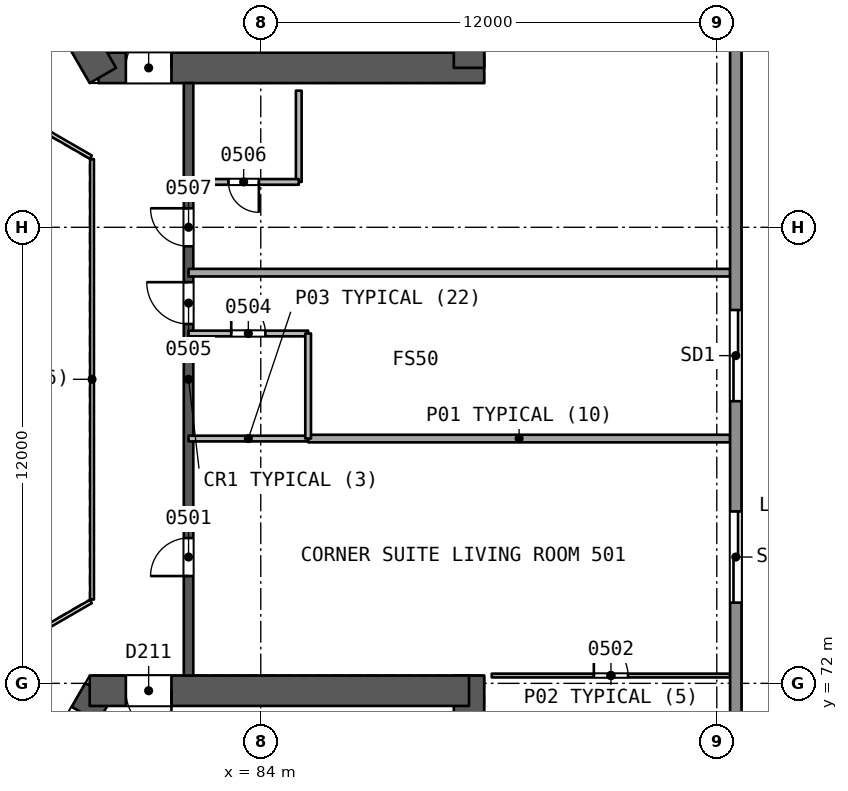
"""IFC4 building model, lengths in metres.
Left out: names, types, materials, properties, quantities, classifications, styles, units other than length and angle.
Written with IfcOpenShell. Run it as: python <this file> out.ifc"""

import sys

from ifc_helpers import new_model, si_unit, direction, frame, frame_2d, origin, place, context, subcontext, project, spatial, rectangle, extrude, element, fill, save


model = new_model("IFC4")
c1 = context("Model", 3, precision=1e-05, world=origin(), true_north=direction((0.0, 1.0)))
c2 = subcontext(c1, "Body", "Model", "MODEL_VIEW")
j1 = project(units=[si_unit("LENGTHUNIT", "METRE"), si_unit("PLANEANGLEUNIT", "RADIAN")], contexts=[c1])
p1 = place(None, origin())
s1 = spatial("IfcSite", under=j1, at=p1, CompositionType="ELEMENT")
p2 = place(p1, origin())
s2 = spatial("IfcBuilding", under=s1, at=p2, CompositionType="ELEMENT")
p3 = place(p2, frame((0.0, 0.0, 30.0)))
s3 = spatial("IfcBuildingStorey", under=s2, at=p3, CompositionType="ELEMENT", Elevation=30.0)
p4 = place(p3, frame((79.731, 88.194, 0.0), z_axis=(0.0, 0.0, 1.0), x_axis=(1.0, 0.0, 0.0)))
e1 = element("IfcWall", 1, at=p4, inside=s3, PredefinedType="SHEAR", context=c2, shape_type="SweptSolid", body=[
    extrude(rectangle(XDim=10.149, YDim=0.8, at=frame_2d((5.074, 0.0))), origin(), (0.0, 0.0, 1.0), 3.7),
])
p5 = place(p4, frame((0.719, 0.0, 0.0)))
e2 = element("IfcOpeningElement", 2, at=p5, cuts=e1, PredefinedType="OPENING", context=c2, shape_type="SweptSolid", body=[
    extrude(rectangle(XDim=1.2, YDim=2.1, at=frame_2d((0.6, 1.05))), frame((0.0, 0.411, 0.0), z_axis=(0.0, -1.0, 0.0), x_axis=(1.0, 0.0, 0.0)), (0.0, 0.0, 1.0), 0.821),
])
p6 = place(p3, frame((89.48, 88.194, 0.0), z_axis=(0.0, 0.0, 1.0), x_axis=(0.0, 1.0, 0.0)))
e3 = element("IfcWall", 3, at=p6, inside=s3, PredefinedType="SHEAR", context=c2, shape_type="SweptSolid", body=[
    extrude(rectangle(XDim=13.933, YDim=0.8, at=frame_2d((6.967, 0.0))), origin(), (0.0, 0.0, 1.0), 3.7),
])
p7 = place(p3, frame((74.856, 96.637, 0.0), z_axis=(0.0, 0.0, 1.0), x_axis=(0.499993500917, -0.866029155999, 0.0)))
e4 = element("IfcWall", 4, at=p7, inside=s3, PredefinedType="SHEAR", context=c2, shape_type="SweptSolid", body=[
    extrude(rectangle(XDim=9.98, YDim=0.8, at=frame_2d((4.99, 0.0))), origin(), (0.0, 0.0, 1.0), 3.7),
])
p8 = place(p7, frame((7.83, 0.0, 0.0)))
e5 = element("IfcOpeningElement", 5, at=p8, cuts=e4, PredefinedType="OPENING", context=c2, shape_type="SweptSolid", body=[
    extrude(rectangle(XDim=1.2, YDim=2.1, at=frame_2d((0.6, 1.05))), frame((0.0, 0.411, 0.0), z_axis=(0.0, -1.0, 0.0), x_axis=(1.0, 0.0, 0.0)), (0.0, 0.0, 1.0), 0.821),
])
p9 = place(p3, frame((79.731, 71.806, 0.0), z_axis=(0.0, 0.0, 1.0), x_axis=(-0.49999662545, -0.866027352073, 0.0)))
e6 = element("IfcWall", 6, at=p9, inside=s3, PredefinedType="SHEAR", context=c2, shape_type="SweptSolid", body=[
    extrude(rectangle(XDim=10.149, YDim=0.8, at=frame_2d((5.074, 0.0))), origin(), (0.0, 0.0, 1.0), 3.7),
])
p10 = place(p9, frame((0.719, 0.0, 0.0)))
e7 = element("IfcOpeningElement", 7, at=p10, cuts=e6, PredefinedType="OPENING", context=c2, shape_type="SweptSolid", body=[
    extrude(rectangle(XDim=1.2, YDim=2.1, at=frame_2d((0.6, 1.05))), frame((0.0, 0.411, 0.0), z_axis=(0.0, -1.0, 0.0), x_axis=(1.0, 0.0, 0.0)), (0.0, 0.0, 1.0), 0.821),
])
p11 = place(p3, frame((89.48, 58.103, 0.0), z_axis=(0.0, 0.0, 1.0), x_axis=(0.0, 1.0, 0.0)))
e8 = element("IfcWall", 8, at=p11, inside=s3, PredefinedType="SHEAR", context=c2, shape_type="SweptSolid", body=[
    extrude(rectangle(XDim=14.103, YDim=0.8, at=frame_2d((7.051, 0.0))), origin(), (0.0, 0.0, 1.0), 3.7),
])
p12 = place(p3, frame((89.48, 71.806, 0.0), z_axis=(0.0, 0.0, 1.0), x_axis=(-1.0, 0.0, 0.0)))
e9 = element("IfcWall", 9, at=p12, inside=s3, PredefinedType="SHEAR", context=c2, shape_type="SweptSolid", body=[
    extrude(rectangle(XDim=9.98, YDim=0.8, at=frame_2d((4.99, 0.0))), origin(), (0.0, 0.0, 1.0), 3.7),
])
p13 = place(p12, frame((7.83, 0.0, 0.0)))
e10 = element("IfcOpeningElement", 10, at=p13, cuts=e9, PredefinedType="OPENING", context=c2, shape_type="SweptSolid", body=[
    extrude(rectangle(XDim=1.2, YDim=2.1, at=frame_2d((0.6, 1.05))), frame((0.0, 0.411, 0.0), z_axis=(0.0, -1.0, 0.0), x_axis=(1.0, 0.0, 0.0)), (0.0, 0.0, 1.0), 0.821),
])
p14 = place(p3, frame((82.1, 72.206, 0.0), z_axis=(0.0, 0.0, 1.0), x_axis=(0.0, 1.0, 0.0)))
e11 = element("IfcWall", 11, at=p14, inside=s3, PredefinedType="SHEAR", context=c2, shape_type="SweptSolid", body=[
    extrude(rectangle(XDim=15.588, YDim=0.25, at=frame_2d((7.794, 0.0))), origin(), (0.0, 0.0, 1.0), 3.2),
])
p15 = place(p14, frame((2.618, 0.0, 0.0)))
e12 = element("IfcOpeningElement", 12, at=p15, cuts=e11, PredefinedType="OPENING", context=c2, shape_type="SweptSolid", body=[
    extrude(rectangle(XDim=1.0, YDim=2.1, at=frame_2d((0.5, 1.05))), frame((0.0, 0.135, 0.0), z_axis=(0.0, -1.0, 0.0), x_axis=(1.0, 0.0, 0.0)), (0.0, 0.0, 1.0), 0.271),
])
p16 = place(p14, frame((9.25, 0.0, 0.0)))
e13 = element("IfcOpeningElement", 13, at=p16, cuts=e11, PredefinedType="OPENING", context=c2, shape_type="SweptSolid", body=[
    extrude(rectangle(XDim=1.1, YDim=2.1, at=frame_2d((0.55, 1.05))), frame((0.0, 0.135, 0.0), z_axis=(0.0, -1.0, 0.0), x_axis=(1.0, 0.0, 0.0)), (0.0, 0.0, 1.0), 0.271),
])
p17 = place(p14, frame((11.294, 0.0, 0.0)))
e14 = element("IfcOpeningElement", 14, at=p17, cuts=e11, PredefinedType="OPENING", context=c2, shape_type="SweptSolid", body=[
    extrude(rectangle(XDim=1.0, YDim=2.1, at=frame_2d((0.5, 1.05))), frame((0.0, 0.135, 0.0), z_axis=(0.0, -1.0, 0.0), x_axis=(1.0, 0.0, 0.0)), (0.0, 0.0, 1.0), 0.271),
])
p18 = place(p3, frame((90.079, 72.206, 0.0), z_axis=(0.0, 0.0, 1.0), x_axis=(1.0, 0.0, 0.0)))
e15 = element("IfcWall", 15, at=p18, inside=s3, PredefinedType="PARTITIONING", context=c2, shape_type="SweptSolid", body=[
    extrude(rectangle(XDim=6.272, YDim=0.1, at=frame_2d((3.136, 0.0))), origin(), (0.0, 0.0, 1.0), 3.2),
])
p19 = place(p18, frame((2.686, 0.0, 0.0)))
e16 = element("IfcOpeningElement", 16, at=p19, cuts=e15, PredefinedType="OPENING", context=c2, shape_type="SweptSolid", body=[
    extrude(rectangle(XDim=0.9, YDim=2.1, at=frame_2d((0.45, 1.05))), frame((0.0, 0.061, 0.0), z_axis=(0.0, -1.0, 0.0), x_axis=(1.0, 0.0, 0.0)), (0.0, 0.0, 1.0), 0.121),
])
p20 = place(p3, frame((96.351, 78.441, 0.0), z_axis=(0.0, 0.0, 1.0), x_axis=(-1.0, 0.0, 0.0)))
e17 = element("IfcWall", 17, at=p20, inside=s3, PredefinedType="PARTITIONING", context=c2, shape_type="SweptSolid", body=[
    extrude(rectangle(XDim=11.104, YDim=0.2, at=frame_2d((5.552, 0.0))), origin(), (0.0, 0.0, 1.0), 3.2),
])
p21 = place(p3, frame((85.247, 78.441, 0.0), z_axis=(0.0, 0.0, 1.0), x_axis=(-1.0, 0.0, 0.0)))
e18 = element("IfcWall", 18, at=p21, inside=s3, PredefinedType="PARTITIONING", context=c2, shape_type="SweptSolid", body=[
    extrude(rectangle(XDim=3.147, YDim=0.15, at=frame_2d((1.573, 0.0))), origin(), (0.0, 0.0, 1.0), 3.2),
])
p22 = place(p3, frame((82.1, 81.206, 0.0), z_axis=(0.0, 0.0, 1.0), x_axis=(1.0, 0.0, 0.0)))
e19 = element("IfcWall", 19, at=p22, inside=s3, PredefinedType="PARTITIONING", context=c2, shape_type="SweptSolid", body=[
    extrude(rectangle(XDim=3.147, YDim=0.15, at=frame_2d((1.573, 0.0))), origin(), (0.0, 0.0, 1.0), 3.2),
])
p23 = place(p22, frame((1.123, 0.0, 0.0)))
e20 = element("IfcOpeningElement", 20, at=p23, cuts=e19, PredefinedType="OPENING", context=c2, shape_type="SweptSolid", body=[
    extrude(rectangle(XDim=0.9, YDim=2.1, at=frame_2d((0.45, 1.05))), frame((0.0, 0.085, 0.0), z_axis=(0.0, -1.0, 0.0), x_axis=(1.0, 0.0, 0.0)), (0.0, 0.0, 1.0), 0.171),
])
p24 = place(p3, frame((85.247, 81.206, 0.0), z_axis=(0.0, 0.0, 1.0), x_axis=(0.0, -1.0, 0.0)))
e21 = element("IfcWall", 21, at=p24, inside=s3, PredefinedType="PARTITIONING", context=c2, shape_type="SweptSolid", body=[
    extrude(rectangle(XDim=2.765, YDim=0.15, at=frame_2d((1.382, 0.0))), origin(), (0.0, 0.0, 1.0), 3.2),
])
p25 = place(p3, frame((96.351, 82.806, 0.0), z_axis=(0.0, 0.0, 1.0), x_axis=(-1.0, 0.0, 0.0)))
e22 = element("IfcWall", 22, at=p25, inside=s3, PredefinedType="PARTITIONING", context=c2, shape_type="SweptSolid", body=[
    extrude(rectangle(XDim=14.251, YDim=0.2, at=frame_2d((7.125, 0.0))), origin(), (0.0, 0.0, 1.0), 3.2),
])
p26 = place(p3, frame((85.0, 87.595, 0.0), z_axis=(0.0, 0.0, 1.0), x_axis=(0.0, -1.0, 0.0)))
e23 = element("IfcWall", 23, at=p26, inside=s3, PredefinedType="PARTITIONING", context=c2, shape_type="SweptSolid", body=[
    extrude(rectangle(XDim=2.401, YDim=0.15, at=frame_2d((1.2, 0.0))), origin(), (0.0, 0.0, 1.0), 3.2),
])
p27 = place(p3, frame((85.0, 85.194, 0.0), z_axis=(0.0, 0.0, 1.0), x_axis=(-1.0, 0.0, 0.0)))
e24 = element("IfcWall", 24, at=p27, inside=s3, PredefinedType="PARTITIONING", context=c2, shape_type="SweptSolid", body=[
    extrude(rectangle(XDim=2.9, YDim=0.15, at=frame_2d((1.45, 0.0))), origin(), (0.0, 0.0, 1.0), 3.2),
])
p28 = place(p27, frame((1.05, 0.0, 0.0)))
e25 = element("IfcOpeningElement", 25, at=p28, cuts=e24, PredefinedType="OPENING", context=c2, shape_type="SweptSolid", body=[
    extrude(rectangle(XDim=0.8, YDim=2.1, at=frame_2d((0.4, 1.05))), frame((0.0, 0.085, 0.0), z_axis=(0.0, -1.0, 0.0), x_axis=(1.0, 0.0, 0.0)), (0.0, 0.0, 1.0), 0.171),
])
p29 = place(p3, frame((96.5, 110.912, 0.0), z_axis=(0.0, 0.0, 1.0), x_axis=(0.0, -1.0, 0.0)))
e26 = element("IfcWall", 26, at=p29, inside=s3, PredefinedType="SOLIDWALL", context=c2, shape_type="SweptSolid", body=[
    extrude(rectangle(XDim=61.825, YDim=0.3, at=frame_2d((30.912, 0.0))), origin(), (0.0, 0.0, 1.0), 3.2),
])
p30 = place(p29, frame((29.089, 0.0, 0.0)))
e27 = element("IfcOpeningElement", 27, at=p30, cuts=e26, PredefinedType="OPENING", context=c2, shape_type="SweptSolid", body=[
    extrude(rectangle(XDim=2.4, YDim=2.4, at=frame_2d((1.2, 1.2))), frame((0.0, 0.161, 0.0), z_axis=(0.0, -1.0, 0.0), x_axis=(1.0, 0.0, 0.0)), (0.0, 0.0, 1.0), 0.321),
])
p31 = place(p29, frame((34.389, 0.0, 0.0)))
e28 = element("IfcOpeningElement", 28, at=p31, cuts=e26, PredefinedType="OPENING", context=c2, shape_type="SweptSolid", body=[
    extrude(rectangle(XDim=2.4, YDim=2.4, at=frame_2d((1.2, 1.2))), frame((0.0, 0.161, 0.0), z_axis=(0.0, -1.0, 0.0), x_axis=(1.0, 0.0, 0.0)), (0.0, 0.0, 1.0), 0.321),
])
p32 = place(p29, frame((47.93, 0.0, 0.0)))
e29 = element("IfcOpeningElement", 29, at=p32, cuts=e26, PredefinedType="OPENING", context=c2, shape_type="SweptSolid", body=[
    extrude(rectangle(XDim=2.4, YDim=2.4, at=frame_2d((1.2, 1.2))), frame((0.0, 0.161, 0.0), z_axis=(0.0, -1.0, 0.0), x_axis=(1.0, 0.0, 0.0)), (0.0, 0.0, 1.0), 0.321),
])
p33 = place(p29, frame((12.81, 0.0, 0.0)))
e30 = element("IfcOpeningElement", 30, at=p33, cuts=e26, PredefinedType="OPENING", context=c2, shape_type="SweptSolid", body=[
    extrude(rectangle(XDim=2.4, YDim=2.4, at=frame_2d((1.2, 1.2))), frame((0.0, 0.161, 0.0), z_axis=(0.0, -1.0, 0.0), x_axis=(1.0, 0.0, 0.0)), (0.0, 0.0, 1.0), 0.321),
])
p34 = place(p3, frame((37.479, 83.163, 0.0), z_axis=(0.0, 0.0, 1.0), x_axis=(0.866024340432, 0.500001841776, 0.0)))
e31 = element("IfcWall", 31, at=p34, inside=s3, PredefinedType="SOLIDWALL", context=c2, shape_type="SweptSolid", body=[
    extrude(rectangle(XDim=61.824, YDim=0.3, at=frame_2d((30.912, 0.0))), origin(), (0.0, 0.0, 1.0), 3.2),
])
p35 = place(p34, frame((29.556, 0.0, 0.0)))
e32 = element("IfcOpeningElement", 32, at=p35, cuts=e31, PredefinedType="OPENING", context=c2, shape_type="SweptSolid", body=[
    extrude(rectangle(XDim=2.4, YDim=2.4, at=frame_2d((1.2, 1.2))), frame((0.0, 0.161, 0.0), z_axis=(0.0, -1.0, 0.0), x_axis=(1.0, 0.0, 0.0)), (0.0, 0.0, 1.0), 0.321),
])
p36 = place(p34, frame((35.012, 0.0, 0.0)))
e33 = element("IfcOpeningElement", 33, at=p36, cuts=e31, PredefinedType="OPENING", context=c2, shape_type="SweptSolid", body=[
    extrude(rectangle(XDim=2.4, YDim=2.4, at=frame_2d((1.2, 1.2))), frame((0.0, 0.161, 0.0), z_axis=(0.0, -1.0, 0.0), x_axis=(1.0, 0.0, 0.0)), (0.0, 0.0, 1.0), 0.321),
])
p37 = place(p34, frame((47.93, 0.0, 0.0)))
e34 = element("IfcOpeningElement", 34, at=p37, cuts=e31, PredefinedType="OPENING", context=c2, shape_type="SweptSolid", body=[
    extrude(rectangle(XDim=2.4, YDim=2.4, at=frame_2d((1.2, 1.2))), frame((0.0, 0.161, 0.0), z_axis=(0.0, -1.0, 0.0), x_axis=(1.0, 0.0, 0.0)), (0.0, 0.0, 1.0), 0.321),
])
p38 = place(p34, frame((24.256, 0.0, 0.0)))
e35 = element("IfcOpeningElement", 35, at=p38, cuts=e31, PredefinedType="OPENING", context=c2, shape_type="SweptSolid", body=[
    extrude(rectangle(XDim=2.4, YDim=2.4, at=frame_2d((1.2, 1.2))), frame((0.0, 0.161, 0.0), z_axis=(0.0, -1.0, 0.0), x_axis=(1.0, 0.0, 0.0)), (0.0, 0.0, 1.0), 0.321),
])
p39 = place(p34, frame((11.509, 0.0, 0.0)))
e36 = element("IfcOpeningElement", 36, at=p39, cuts=e31, PredefinedType="OPENING", context=c2, shape_type="SweptSolid", body=[
    extrude(rectangle(XDim=2.4, YDim=2.4, at=frame_2d((1.2, 1.2))), frame((0.0, 0.161, 0.0), z_axis=(0.0, -1.0, 0.0), x_axis=(1.0, 0.0, 0.0)), (0.0, 0.0, 1.0), 0.321),
])
p40 = place(p3, frame((91.021, 45.924, 0.0), z_axis=(0.0, 0.0, 1.0), x_axis=(-0.866024340432, 0.500001841776, 0.0)))
e37 = element("IfcWall", 37, at=p40, inside=s3, PredefinedType="SOLIDWALL", context=c2, shape_type="SweptSolid", body=[
    extrude(rectangle(XDim=61.824, YDim=0.3, at=frame_2d((30.912, 0.0))), origin(), (0.0, 0.0, 1.0), 3.2),
])
p41 = place(p40, frame((35.168, 0.0, 0.0)))
e38 = element("IfcOpeningElement", 38, at=p41, cuts=e37, PredefinedType="OPENING", context=c2, shape_type="SweptSolid", body=[
    extrude(rectangle(XDim=2.4, YDim=2.4, at=frame_2d((1.2, 1.2))), frame((0.0, 0.161, 0.0), z_axis=(0.0, -1.0, 0.0), x_axis=(1.0, 0.0, 0.0)), (0.0, 0.0, 1.0), 0.321),
])
p42 = place(p40, frame((47.93, 0.0, 0.0)))
e39 = element("IfcOpeningElement", 39, at=p42, cuts=e37, PredefinedType="OPENING", context=c2, shape_type="SweptSolid", body=[
    extrude(rectangle(XDim=2.4, YDim=2.4, at=frame_2d((1.2, 1.2))), frame((0.0, 0.161, 0.0), z_axis=(0.0, -1.0, 0.0), x_axis=(1.0, 0.0, 0.0)), (0.0, 0.0, 1.0), 0.321),
])
p43 = place(p40, frame((24.724, 0.0, 0.0)))
e40 = element("IfcOpeningElement", 40, at=p43, cuts=e37, PredefinedType="OPENING", context=c2, shape_type="SweptSolid", body=[
    extrude(rectangle(XDim=2.4, YDim=2.4, at=frame_2d((1.2, 1.2))), frame((0.0, 0.161, 0.0), z_axis=(0.0, -1.0, 0.0), x_axis=(1.0, 0.0, 0.0)), (0.0, 0.0, 1.0), 0.321),
])
p44 = place(p40, frame((11.509, 0.0, 0.0)))
e41 = element("IfcOpeningElement", 41, at=p44, cuts=e37, PredefinedType="OPENING", context=c2, shape_type="SweptSolid", body=[
    extrude(rectangle(XDim=2.4, YDim=2.4, at=frame_2d((1.2, 1.2))), frame((0.0, 0.161, 0.0), z_axis=(0.0, -1.0, 0.0), x_axis=(1.0, 0.0, 0.0)), (0.0, 0.0, 1.0), 0.321),
])
p45 = place(p40, frame((31.805, 0.0, 0.9)))
e42 = element("IfcOpeningElement", 42, at=p45, cuts=e37, PredefinedType="OPENING", context=c2, shape_type="SweptSolid", body=[
    extrude(rectangle(XDim=1.8, YDim=1.5, at=frame_2d((0.9, 0.75))), frame((0.0, 0.161, 0.0), z_axis=(0.0, -1.0, 0.0), x_axis=(1.0, 0.0, 0.0)), (0.0, 0.0, 1.0), 0.321),
])
p46 = place(p40, frame((29.155, 0.0, 0.9)))
e43 = element("IfcOpeningElement", 43, at=p46, cuts=e37, PredefinedType="OPENING", context=c2, shape_type="SweptSolid", body=[
    extrude(rectangle(XDim=1.8, YDim=1.5, at=frame_2d((0.9, 0.75))), frame((0.0, 0.161, 0.0), z_axis=(0.0, -1.0, 0.0), x_axis=(1.0, 0.0, 0.0)), (0.0, 0.0, 1.0), 0.321),
])
p47 = place(p3, frame((79.56, 74.206, 0.0), z_axis=(0.0, 0.0, 1.0), x_axis=(0.0, 1.0, 0.0)))
e44 = element("IfcWall", 44, at=p47, inside=s3, PredefinedType="PARTITIONING", context=c2, shape_type="SweptSolid", body=[
    extrude(rectangle(XDim=11.588, YDim=0.1, at=frame_2d((5.794, 0.0))), origin(), (0.0, 0.0, 1.0), 3.2),
])
for number, where, z_axis, x_axis in (
    (45, (79.53, 85.846, 0.0), (0.0, 0.0, 1.0), (-0.866, 0.5, 0.0)),
    (46, (77.798, 73.154, 0.0), (0.0, 0.0, 1.0), (0.866, 0.5, 0.0)),
):
    element("IfcWall", number, at=place(p3, frame(where, z_axis=z_axis, x_axis=x_axis)), inside=s3, PredefinedType="PARTITIONING", context=c2, shape_type="SweptSolid", body=[
        extrude(rectangle(XDim=2.0, YDim=0.1, at=frame_2d((1.0, 0.0))), origin(), (0.0, 0.0, 1.0), 3.2),
    ])
p48 = place(p15, origin())
e47 = element("IfcDoor", 47, at=p48, inside=s3, OperationType="SINGLE_SWING_LEFT", PredefinedType="NOTDEFINED", context=c2, shape_type="SweptSolid", body=[
    extrude(rectangle(XDim=1.0, YDim=2.1, at=frame_2d((0.5, 1.05))), frame((0.0, 0.025, 0.0), z_axis=(0.0, -1.0, 0.0), x_axis=(1.0, 0.0, 0.0)), (0.0, 0.0, 1.0), 0.05),
])
fill(e12, e47)
p49 = place(p19, origin())
e48 = element("IfcDoor", 48, at=p49, inside=s3, OperationType="SINGLE_SWING_LEFT", PredefinedType="NOTDEFINED", context=c2, shape_type="SweptSolid", body=[
    extrude(rectangle(XDim=0.9, YDim=2.1, at=frame_2d((0.45, 1.05))), frame((0.0, 0.025, 0.0), z_axis=(0.0, -1.0, 0.0), x_axis=(1.0, 0.0, 0.0)), (0.0, 0.0, 1.0), 0.05),
])
fill(e16, e48)
p50 = place(p23, origin())
e49 = element("IfcDoor", 49, at=p50, inside=s3, OperationType="SINGLE_SWING_LEFT", PredefinedType="NOTDEFINED", context=c2, shape_type="SweptSolid", body=[
    extrude(rectangle(XDim=0.9, YDim=2.1, at=frame_2d((0.45, 1.05))), frame((0.0, 0.025, 0.0), z_axis=(0.0, -1.0, 0.0), x_axis=(1.0, 0.0, 0.0)), (0.0, 0.0, 1.0), 0.05),
])
fill(e20, e49)
p51 = place(p16, origin())
e50 = element("IfcDoor", 50, at=p51, inside=s3, OperationType="SINGLE_SWING_RIGHT", PredefinedType="NOTDEFINED", context=c2, shape_type="SweptSolid", body=[
    extrude(rectangle(XDim=1.1, YDim=2.1, at=frame_2d((0.55, 1.05))), frame((0.0, 0.025, 0.0), z_axis=(0.0, -1.0, 0.0), x_axis=(1.0, 0.0, 0.0)), (0.0, 0.0, 1.0), 0.05),
])
fill(e13, e50)
p52 = place(p28, origin())
e51 = element("IfcDoor", 51, at=p52, inside=s3, OperationType="SINGLE_SWING_LEFT", PredefinedType="NOTDEFINED", context=c2, shape_type="SweptSolid", body=[
    extrude(rectangle(XDim=0.8, YDim=2.1, at=frame_2d((0.4, 1.05))), frame((0.0, 0.025, 0.0), z_axis=(0.0, -1.0, 0.0), x_axis=(1.0, 0.0, 0.0)), (0.0, 0.0, 1.0), 0.05),
])
fill(e25, e51)
p53 = place(p17, origin())
e52 = element("IfcDoor", 52, at=p53, inside=s3, OperationType="SINGLE_SWING_RIGHT", PredefinedType="NOTDEFINED", context=c2, shape_type="SweptSolid", body=[
    extrude(rectangle(XDim=1.0, YDim=2.1, at=frame_2d((0.5, 1.05))), frame((0.0, 0.025, 0.0), z_axis=(0.0, -1.0, 0.0), x_axis=(1.0, 0.0, 0.0)), (0.0, 0.0, 1.0), 0.05),
])
fill(e14, e52)
p54 = place(p30, origin())
e53 = element("IfcDoor", 53, at=p54, inside=s3, OperationType="SLIDING_TO_LEFT", PredefinedType="NOTDEFINED", context=c2, shape_type="SweptSolid", body=[
    extrude(rectangle(XDim=2.4, YDim=2.4, at=frame_2d((1.2, 1.2))), frame((0.0, 0.025, 0.0), z_axis=(0.0, -1.0, 0.0), x_axis=(1.0, 0.0, 0.0)), (0.0, 0.0, 1.0), 0.05),
])
fill(e27, e53)
p55 = place(p31, origin())
e54 = element("IfcDoor", 54, at=p55, inside=s3, OperationType="SLIDING_TO_RIGHT", PredefinedType="NOTDEFINED", context=c2, shape_type="SweptSolid", body=[
    extrude(rectangle(XDim=2.4, YDim=2.4, at=frame_2d((1.2, 1.2))), frame((0.0, 0.025, 0.0), z_axis=(0.0, -1.0, 0.0), x_axis=(1.0, 0.0, 0.0)), (0.0, 0.0, 1.0), 0.05),
])
fill(e28, e54)
p56 = place(p5, origin())
e55 = element("IfcDoor", 55, at=p56, inside=s3, OperationType="SINGLE_SWING_RIGHT", PredefinedType="NOTDEFINED", context=c2, shape_type="SweptSolid", body=[
    extrude(rectangle(XDim=1.2, YDim=2.1, at=frame_2d((0.6, 1.05))), frame((0.0, 0.025, 0.0), z_axis=(0.0, -1.0, 0.0), x_axis=(1.0, 0.0, 0.0)), (0.0, 0.0, 1.0), 0.05),
])
fill(e2, e55)
p57 = place(p13, origin())
e56 = element("IfcDoor", 56, at=p57, inside=s3, OperationType="SINGLE_SWING_LEFT", PredefinedType="NOTDEFINED", context=c2, shape_type="SweptSolid", body=[
    extrude(rectangle(XDim=1.2, YDim=2.1, at=frame_2d((0.6, 1.05))), frame((0.0, 0.025, 0.0), z_axis=(0.0, -1.0, 0.0), x_axis=(1.0, 0.0, 0.0)), (0.0, 0.0, 1.0), 0.05),
])
fill(e10, e56)
save(model, sys.argv[1])
